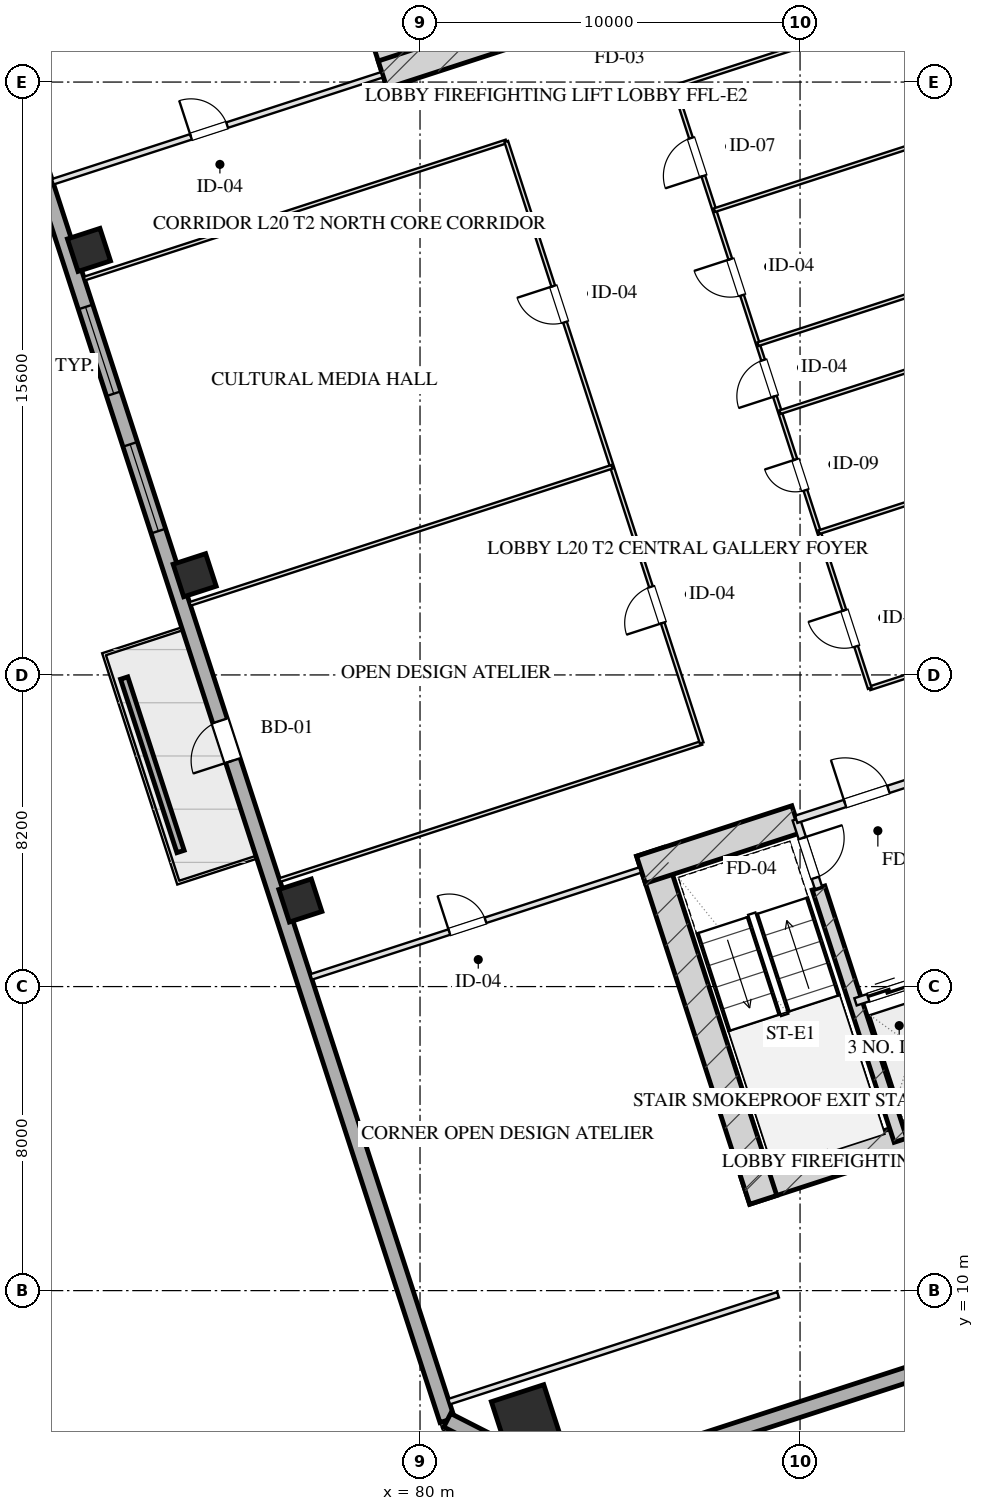
"""IFC4 building model, lengths in metres.
Left out: names, types, materials, properties, quantities, classifications, styles, units other than length and angle.
Written with IfcOpenShell. Run it as: python <this file> out.ifc"""

import sys

from ifc_helpers import new_model, si_unit, direction, frame, frame_2d, origin, origin_2d, place, context, subcontext, project, spatial, rectangle, hollow_rectangle, extrude, element, fill, save


model = new_model("IFC4")
c1 = context("Model", 3, precision=1e-05, world=origin(), true_north=direction((0.0, 1.0)))
c2 = subcontext(c1, "Body", "Model", "MODEL_VIEW")
j1 = project(units=[si_unit("LENGTHUNIT", "METRE"), si_unit("PLANEANGLEUNIT", "RADIAN")], contexts=[c1])
p1 = place(None, origin())
s1 = spatial("IfcSite", under=j1, at=p1, CompositionType="ELEMENT")
p2 = place(p1, origin())
s2 = spatial("IfcBuilding", under=s1, at=p2, CompositionType="ELEMENT")
p3 = place(p2, frame((0.0, 0.0, 81.65)))
s3 = spatial("IfcBuildingStorey", under=s2, at=p3, CompositionType="ELEMENT", Elevation=81.65)
p4 = place(p3, frame((88.559, 12.629, 0.0), z_axis=(0.0, 0.0, 1.0), x_axis=(0.951056072937, 0.309018358888, 0.0)))
e1 = element("IfcWall", 1, at=p4, inside=s3, PredefinedType="SHEAR", context=c2, shape_type="SweptSolid", body=[
    extrude(rectangle(XDim=16.55, YDim=0.75, at=frame_2d((8.275, 0.0))), origin(), (0.0, 0.0, 1.0), 3.45),
])
p5 = place(p3, frame((86.055, 21.546, 0.0), z_axis=(0.0, 0.0, 1.0), x_axis=(0.309023585745, -0.951054374604, 0.0)))
e2 = element("IfcWall", 2, at=p5, inside=s3, PredefinedType="SHEAR", context=c2, shape_type="SweptSolid", body=[
    extrude(rectangle(XDim=9.63, YDim=0.75, at=frame_2d((4.815, 0.0))), origin(), (0.0, 0.0, 1.0), 3.45),
])
p6 = place(p3, frame((90.486, 20.594, 0.0), z_axis=(0.0, 0.0, 1.0), x_axis=(0.309020428229, -0.951055400562, 0.0)))
e3 = element("IfcWall", 3, at=p6, inside=s3, PredefinedType="SHEAR", context=c2, shape_type="SweptSolid", body=[
    extrude(rectangle(XDim=6.98, YDim=0.35, at=frame_2d((3.49, 0.0))), origin(), (0.0, 0.0, 1.0), 3.45),
])
p7 = place(p3, frame((85.814, 21.074, 0.0), z_axis=(0.0, 0.0, 1.0), x_axis=(0.95106580992, 0.308988390074, 0.0)))
e4 = element("IfcWall", 4, at=p7, inside=s3, PredefinedType="SHEAR", context=c2, shape_type="SweptSolid", body=[
    extrude(rectangle(XDim=4.295, YDim=0.75, at=frame_2d((2.147, 0.0))), origin(), (0.0, 0.0, 1.0), 3.45),
])
p8 = place(p3, frame((79.489, 41.756, 0.0), z_axis=(0.0, 0.0, 1.0), x_axis=(-0.309016134813, 0.951056795583, 0.0)))
e5 = element("IfcWall", 5, at=p8, inside=s3, PredefinedType="SHEAR", context=c2, shape_type="SweptSolid", body=[
    extrude(rectangle(XDim=9.63, YDim=0.75, at=frame_2d((4.815, 0.0))), origin(), (0.0, 0.0, 1.0), 3.45),
])
p9 = place(p3, frame((79.016, 41.997, 0.0), z_axis=(0.0, 0.0, 1.0), x_axis=(0.95106038264, 0.309005094736, 0.0)))
e6 = element("IfcWall", 6, at=p9, inside=s3, PredefinedType="SHEAR", context=c2, shape_type="SweptSolid", body=[
    extrude(rectangle(XDim=4.295, YDim=0.75, at=frame_2d((2.147, 0.0))), origin(), (0.0, 0.0, 1.0), 3.45),
])
p10 = place(p3, frame((82.791, 6.612, 0.0), z_axis=(0.0, 0.0, 1.0), x_axis=(0.951056516295, 0.309016994375, 0.0)))
e7 = element("IfcColumn", 7, at=p10, inside=s3, PredefinedType="COLUMN", context=c2, shape_type="SweptSolid", body=[
    extrude(hollow_rectangle(XDim=1.45, YDim=1.45, WallThickness=0.05, at=origin_2d()), origin(), (0.0, 0.0, 1.0), 3.451),
])
for number, where, z_axis, x_axis in (
    (8, (76.851, 20.264, 0.0), (0.0, 0.0, 1.0), (0.951, 0.309, 0.0)),
    (9, (74.07, 28.824, 0.0), (0.0, 0.0, 1.0), (0.951, 0.309, 0.0)),
    (10, (71.289, 37.384, 0.0), (0.0, 0.0, 1.0), (0.951, 0.309, 0.0)),
):
    element("IfcColumn", number, at=place(p3, frame(where, z_axis=z_axis, x_axis=x_axis)), inside=s3, PredefinedType="COLUMN", context=c2, shape_type="SweptSolid", body=[
        extrude(hollow_rectangle(XDim=0.9, YDim=0.9, WallThickness=0.032, at=origin_2d()), origin(), (0.0, 0.0, 1.0), 3.451),
    ])
p11 = place(p3, frame((80.716, 6.59, 0.0), z_axis=(0.0, 0.0, 1.0), x_axis=(-0.309017542002, 0.95105633836, 0.0)))
e11 = element("IfcWall", 11, at=p11, inside=s3, PredefinedType="SOLIDWALL", context=c2, shape_type="SweptSolid", body=[
    extrude(rectangle(XDim=46.4, YDim=0.4, at=frame_2d((23.2, 0.0))), origin(), (0.0, 0.0, 1.0), 2.61),
])
p12 = place(p11, frame((24.6, 0.0, 0.75)))
e12 = element("IfcOpeningElement", 12, at=p12, cuts=e11, PredefinedType="OPENING", context=c2, shape_type="SweptSolid", body=[
    extrude(rectangle(XDim=2.4, YDim=1.46, at=frame_2d((1.2, 0.73))), frame((0.0, 0.21, 0.0), z_axis=(0.0, -1.0, 0.0), x_axis=(1.0, 0.0, 0.0)), (0.0, 0.0, 1.0), 0.42),
])
p13 = place(p11, frame((28.4, 0.0, 0.75)))
e13 = element("IfcOpeningElement", 13, at=p13, cuts=e11, PredefinedType="OPENING", context=c2, shape_type="SweptSolid", body=[
    extrude(rectangle(XDim=2.4, YDim=1.46, at=frame_2d((1.2, 0.73))), frame((0.0, 0.21, 0.0), z_axis=(0.0, -1.0, 0.0), x_axis=(1.0, 0.0, 0.0)), (0.0, 0.0, 1.0), 0.42),
])
p14 = place(p11, frame((18.25, 0.0, 0.0)))
e14 = element("IfcOpeningElement", 14, at=p14, cuts=e11, PredefinedType="OPENING", context=c2, shape_type="SweptSolid", body=[
    extrude(rectangle(XDim=1.1, YDim=2.15, at=frame_2d((0.55, 1.075))), frame((0.0, 0.21, 0.0), z_axis=(0.0, -1.0, 0.0), x_axis=(1.0, 0.0, 0.0)), (0.0, 0.0, 1.0), 0.42),
])
p15 = place(p3, frame((111.953, 14.005, 0.0), z_axis=(0.0, 0.0, 1.0), x_axis=(-0.95105505922, -0.309021478754, 0.0)))
e15 = element("IfcWall", 15, at=p15, inside=s3, PredefinedType="SOLIDWALL", context=c2, shape_type="SweptSolid", body=[
    extrude(rectangle(XDim=29.4, YDim=0.4, at=frame_2d((14.7, 0.0))), origin(), (0.0, 0.0, 1.0), 2.61),
])
p16 = place(p3, frame((83.992, 4.92, 0.0), z_axis=(0.0, 0.0, 1.0), x_axis=(-0.891001999643, 0.45399937955, 0.0)))
e16 = element("IfcWall", 16, at=p16, inside=s3, PredefinedType="SOLIDWALL", context=c2, shape_type="SweptSolid", body=[
    extrude(rectangle(XDim=3.677, YDim=0.4, at=frame_2d((1.839, 0.0))), origin(), (0.0, 0.0, 1.0), 2.61),
])
p17 = place(p3, frame((73.698, 21.553, 0.0), z_axis=(0.0, 0.0, 1.0), x_axis=(-0.309032019345, 0.951051634255, 0.0)))
e17 = element("IfcWall", 17, at=p17, inside=s3, PredefinedType="PARAPET", context=c2, shape_type="SweptSolid", body=[
    extrude(rectangle(XDim=4.8, YDim=0.2, at=frame_2d((2.4, 0.0))), origin(), (0.0, 0.0, 1.0), 0.75),
])
p18 = place(p3, frame((89.899, 22.401, 0.0), z_axis=(0.0, 0.0, 1.0), x_axis=(0.308932062672, -0.951084108086, 0.0)))
e18 = element("IfcWall", 18, at=p18, inside=s3, PredefinedType="PARTITIONING", context=c2, shape_type="SweptSolid", body=[
    extrude(rectangle(XDim=1.9, YDim=0.2, at=frame_2d((0.95, 0.0))), origin(), (0.0, 0.0, 1.0), 3.175),
])
p19 = place(p18, frame((0.52, 0.0, 0.0)))
e19 = element("IfcOpeningElement", 19, at=p19, cuts=e18, PredefinedType="OPENING", context=c2, shape_type="SweptSolid", body=[
    extrude(rectangle(XDim=1.1, YDim=2.05, at=frame_2d((0.55, 1.025))), frame((0.0, 0.11, 0.0), z_axis=(0.0, -1.0, 0.0), x_axis=(1.0, 0.0, 0.0)), (0.0, 0.0, 1.0), 0.22),
])
p20 = place(p3, frame((89.899, 22.401, 0.0), z_axis=(0.0, 0.0, 1.0), x_axis=(0.951046716504, 0.309047153403, 0.0)))
e20 = element("IfcWall", 20, at=p20, inside=s3, PredefinedType="PARTITIONING", context=c2, shape_type="SweptSolid", body=[
    extrude(rectangle(XDim=3.83, YDim=0.2, at=frame_2d((1.915, 0.0))), origin(), (0.0, 0.0, 1.0), 3.175),
])
p21 = place(p20, frame((1.35, 0.0, 0.0)))
e21 = element("IfcOpeningElement", 21, at=p21, cuts=e20, PredefinedType="OPENING", context=c2, shape_type="SweptSolid", body=[
    extrude(rectangle(XDim=1.2, YDim=2.05, at=frame_2d((0.6, 1.025))), frame((0.0, 0.11, 0.0), z_axis=(0.0, -1.0, 0.0), x_axis=(1.0, 0.0, 0.0)), (0.0, 0.0, 1.0), 0.22),
])
p22 = place(p3, frame((91.46, 17.598, 0.0), z_axis=(0.0, 0.0, 1.0), x_axis=(0.951062257173, 0.308999325213, 0.0)))
e22 = element("IfcWall", 22, at=p22, inside=s3, PredefinedType="PARTITIONING", context=c2, shape_type="SweptSolid", body=[
    extrude(rectangle(XDim=2.1, YDim=0.2, at=frame_2d((1.05, 0.0))), origin(), (0.0, 0.0, 1.0), 3.175),
])
p23 = place(p22, frame((0.35, 0.0, 0.0)))
e23 = element("IfcOpeningElement", 23, at=p23, cuts=e22, PredefinedType="OPENING", context=c2, shape_type="SweptSolid", body=[
    extrude(rectangle(XDim=1.1, YDim=2.05, at=frame_2d((0.55, 1.025))), frame((0.0, 0.11, 0.0), z_axis=(0.0, -1.0, 0.0), x_axis=(1.0, 0.0, 0.0)), (0.0, 0.0, 1.0), 0.22),
])
p24 = place(p3, frame((80.767, 7.079, 0.0), z_axis=(0.0, 0.0, 1.0), x_axis=(0.951057133767, 0.309015093986, 0.0)))
e24 = element("IfcWall", 24, at=p24, inside=s3, PredefinedType="PARTITIONING", context=c2, shape_type="SweptSolid", body=[
    extrude(rectangle(XDim=9.1, YDim=0.15, at=frame_2d((4.55, 0.0))), origin(), (0.0, 0.0, 1.0), 3.175),
])
p25 = place(p3, frame((77.136, 18.254, 0.0), z_axis=(0.0, 0.0, 1.0), x_axis=(0.951057133767, 0.309015093986, 0.0)))
e25 = element("IfcWall", 25, at=p25, inside=s3, PredefinedType="PARTITIONING", context=c2, shape_type="SweptSolid", body=[
    extrude(rectangle(XDim=9.1, YDim=0.15, at=frame_2d((4.55, 0.0))), origin(), (0.0, 0.0, 1.0), 3.175),
])
p26 = place(p25, frame((3.822, 0.0, 0.0)))
e26 = element("IfcOpeningElement", 26, at=p26, cuts=e25, PredefinedType="OPENING", context=c2, shape_type="SweptSolid", body=[
    extrude(rectangle(XDim=1.0, YDim=2.05, at=frame_2d((0.5, 1.025))), frame((0.0, 0.085, 0.0), z_axis=(0.0, -1.0, 0.0), x_axis=(1.0, 0.0, 0.0)), (0.0, 0.0, 1.0), 0.17),
])
p27 = place(p3, frame((70.338, 39.177, 0.0), z_axis=(0.0, 0.0, 1.0), x_axis=(0.951059695568, 0.309007209409, 0.0)))
e27 = element("IfcWall", 27, at=p27, inside=s3, PredefinedType="PARTITIONING", context=c2, shape_type="SweptSolid", body=[
    extrude(rectangle(XDim=9.1, YDim=0.15, at=frame_2d((4.55, 0.0))), origin(), (0.0, 0.0, 1.0), 3.175),
])
p28 = place(p27, frame((3.822, 0.0, 0.0)))
e28 = element("IfcOpeningElement", 28, at=p28, cuts=e27, PredefinedType="OPENING", context=c2, shape_type="SweptSolid", body=[
    extrude(rectangle(XDim=1.0, YDim=2.05, at=frame_2d((0.5, 1.025))), frame((0.0, 0.085, 0.0), z_axis=(0.0, -1.0, 0.0), x_axis=(1.0, 0.0, 0.0)), (0.0, 0.0, 1.0), 0.17),
])
p29 = place(p3, frame((76.308, 20.803, 0.0), z_axis=(0.0, 0.0, 1.0), x_axis=(0.951054504848, 0.309023184905, 0.0)))
e29 = element("IfcWall", 29, at=p29, inside=s3, PredefinedType="MOVABLE", context=c2, shape_type="SweptSolid", body=[
    extrude(rectangle(XDim=11.675, YDim=0.1, at=frame_2d((5.838, 0.0))), origin(), (0.0, 0.0, 1.0), 3.175),
])
p30 = place(p3, frame((91.834, 25.848, 0.0), z_axis=(0.0, 0.0, 1.0), x_axis=(0.951055746746, 0.309019362795, 0.0)))
e30 = element("IfcWall", 30, at=p30, inside=s3, PredefinedType="MOVABLE", context=c2, shape_type="SweptSolid", body=[
    extrude(rectangle(XDim=17.875, YDim=0.1, at=frame_2d((8.938, 0.0))), origin(), (0.0, 0.0, 1.0), 3.175),
])
p31 = place(p3, frame((71.166, 36.629, 0.0), z_axis=(0.0, 0.0, 1.0), x_axis=(0.951058653673, 0.309010416124, 0.0)))
e31 = element("IfcWall", 31, at=p31, inside=s3, PredefinedType="MOVABLE", context=c2, shape_type="SweptSolid", body=[
    extrude(rectangle(XDim=11.675, YDim=0.1, at=frame_2d((5.837, 0.0))), origin(), (0.0, 0.0, 1.0), 3.175),
])
p32 = place(p3, frame((86.692, 41.673, 0.0), z_axis=(0.0, 0.0, 1.0), x_axis=(0.951057050993, 0.309015348739, 0.0)))
e32 = element("IfcWall", 32, at=p32, inside=s3, PredefinedType="MOVABLE", context=c2, shape_type="SweptSolid", body=[
    extrude(rectangle(XDim=17.875, YDim=0.1, at=frame_2d((8.938, 0.0))), origin(), (0.0, 0.0, 1.0), 3.175),
])
p33 = place(p3, frame((87.412, 24.411, 0.0), z_axis=(0.0, 0.0, 1.0), x_axis=(-0.309022042254, 0.951054876125, 0.0)))
e33 = element("IfcWall", 33, at=p33, inside=s3, PredefinedType="MOVABLE", context=c2, shape_type="SweptSolid", body=[
    extrude(rectangle(XDim=16.64, YDim=0.1, at=frame_2d((8.32, 0.0))), origin(), (0.0, 0.0, 1.0), 3.175),
])
p34 = place(p33, frame((3.32, 0.0, 0.0)))
e34 = element("IfcOpeningElement", 34, at=p34, cuts=e33, PredefinedType="OPENING", context=c2, shape_type="SweptSolid", body=[
    extrude(rectangle(XDim=1.0, YDim=2.05, at=frame_2d((0.5, 1.025))), frame((0.0, 0.06, 0.0), z_axis=(0.0, -1.0, 0.0), x_axis=(1.0, 0.0, 0.0)), (0.0, 0.0, 1.0), 0.12),
])
p35 = place(p33, frame((11.64, 0.0, 0.0)))
e35 = element("IfcOpeningElement", 35, at=p35, cuts=e33, PredefinedType="OPENING", context=c2, shape_type="SweptSolid", body=[
    extrude(rectangle(XDim=1.0, YDim=2.05, at=frame_2d((0.5, 1.025))), frame((0.0, 0.06, 0.0), z_axis=(0.0, -1.0, 0.0), x_axis=(1.0, 0.0, 0.0)), (0.0, 0.0, 1.0), 0.12),
])
p36 = place(p3, frame((91.834, 25.848, 0.0), z_axis=(0.0, 0.0, 1.0), x_axis=(-0.30901773025, 0.951056277195, 0.0)))
e36 = element("IfcWall", 36, at=p36, inside=s3, PredefinedType="MOVABLE", context=c2, shape_type="SweptSolid", body=[
    extrude(rectangle(XDim=16.64, YDim=0.1, at=frame_2d((8.32, 0.0))), origin(), (0.0, 0.0, 1.0), 3.175),
])
p37 = place(p36, frame((1.16, 0.0, 0.0)))
e37 = element("IfcOpeningElement", 37, at=p37, cuts=e36, PredefinedType="OPENING", context=c2, shape_type="SweptSolid", body=[
    extrude(rectangle(XDim=1.0, YDim=2.05, at=frame_2d((0.5, 1.025))), frame((0.0, 0.06, 0.0), z_axis=(0.0, -1.0, 0.0), x_axis=(1.0, 0.0, 0.0)), (0.0, 0.0, 1.0), 0.12),
])
p38 = place(p36, frame((5.48, 0.0, 0.0)))
e38 = element("IfcOpeningElement", 38, at=p38, cuts=e36, PredefinedType="OPENING", context=c2, shape_type="SweptSolid", body=[
    extrude(rectangle(XDim=0.85, YDim=2.05, at=frame_2d((0.425, 1.025))), frame((0.0, 0.06, 0.0), z_axis=(0.0, -1.0, 0.0), x_axis=(1.0, 0.0, 0.0)), (0.0, 0.0, 1.0), 0.12),
])
p39 = place(p36, frame((8.08, 0.0, 0.0)))
e39 = element("IfcOpeningElement", 39, at=p39, cuts=e36, PredefinedType="OPENING", context=c2, shape_type="SweptSolid", body=[
    extrude(rectangle(XDim=1.0, YDim=2.05, at=frame_2d((0.5, 1.025))), frame((0.0, 0.06, 0.0), z_axis=(0.0, -1.0, 0.0), x_axis=(1.0, 0.0, 0.0)), (0.0, 0.0, 1.0), 0.12),
])
p40 = place(p36, frame((10.874, 0.0, 0.0)))
e40 = element("IfcOpeningElement", 40, at=p40, cuts=e36, PredefinedType="OPENING", context=c2, shape_type="SweptSolid", body=[
    extrude(rectangle(XDim=1.0, YDim=2.05, at=frame_2d((0.5, 1.025))), frame((0.0, 0.06, 0.0), z_axis=(0.0, -1.0, 0.0), x_axis=(1.0, 0.0, 0.0)), (0.0, 0.0, 1.0), 0.12),
])
p41 = place(p36, frame((14.174, 0.0, 0.0)))
e41 = element("IfcOpeningElement", 41, at=p41, cuts=e36, PredefinedType="OPENING", context=c2, shape_type="SweptSolid", body=[
    extrude(rectangle(XDim=1.05, YDim=2.05, at=frame_2d((0.525, 1.025))), frame((0.0, 0.06, 0.0), z_axis=(0.0, -1.0, 0.0), x_axis=(1.0, 0.0, 0.0)), (0.0, 0.0, 1.0), 0.12),
])
p42 = place(p3, frame((73.947, 28.069, 0.0), z_axis=(0.0, 0.0, 1.0), x_axis=(0.951058653673, 0.309010416124, 0.0)))
e42 = element("IfcWall", 42, at=p42, inside=s3, PredefinedType="MOVABLE", context=c2, shape_type="SweptSolid", body=[
    extrude(rectangle(XDim=11.675, YDim=0.1, at=frame_2d((5.837, 0.0))), origin(), (0.0, 0.0, 1.0), 3.175),
])
for number, where, z_axis, x_axis in (
    (43, (90.499, 29.956, 0.0), (0.0, 0.0, 1.0), (0.951, 0.309, 0.0)),
    (44, (89.473, 33.114, 0.0), (0.0, 0.0, 1.0), (0.951, 0.309, 0.0)),
):
    element("IfcWall", number, at=place(p3, frame(where, z_axis=z_axis, x_axis=x_axis)), inside=s3, PredefinedType="MOVABLE", context=c2, shape_type="SweptSolid", body=[
        extrude(rectangle(XDim=17.875, YDim=0.1, at=frame_2d((8.938, 0.0))), origin(), (0.0, 0.0, 1.0), 3.175),
    ])
for number, where, z_axis, x_axis in (
    (45, (88.892, 34.902, 0.0), (0.0, 0.0, 1.0), (0.951, 0.309, 0.0)),
    (46, (87.746, 38.429, 0.0), (0.0, 0.0, 1.0), (0.951, 0.309, 0.0)),
):
    element("IfcWall", number, at=place(p3, frame(where, z_axis=z_axis, x_axis=x_axis)), inside=s3, PredefinedType="MOVABLE", context=c2, shape_type="SweptSolid", body=[
        extrude(rectangle(XDim=17.875, YDim=0.1, at=frame_2d((8.938, 0.0))), origin(), (0.0, 0.0, 1.0), 3.175),
    ])
p43 = place(p12, origin())
e47 = element("IfcWindow", 47, at=p43, inside=s3, PartitioningType="TRIPLE_PANEL_VERTICAL", PredefinedType="WINDOW", context=c2, shape_type="SweptSolid", body=[
    extrude(rectangle(XDim=2.4, YDim=1.46, at=frame_2d((1.2, 0.73))), frame((0.0, 0.03, 0.0), z_axis=(0.0, -1.0, 0.0), x_axis=(1.0, 0.0, 0.0)), (0.0, 0.0, 1.0), 0.06),
])
fill(e12, e47)
p44 = place(p13, origin())
e48 = element("IfcWindow", 48, at=p44, inside=s3, PartitioningType="TRIPLE_PANEL_VERTICAL", PredefinedType="WINDOW", context=c2, shape_type="SweptSolid", body=[
    extrude(rectangle(XDim=2.4, YDim=1.46, at=frame_2d((1.2, 0.73))), frame((0.0, 0.03, 0.0), z_axis=(0.0, -1.0, 0.0), x_axis=(1.0, 0.0, 0.0)), (0.0, 0.0, 1.0), 0.06),
])
fill(e13, e48)
p45 = place(p14, origin())
e49 = element("IfcDoor", 49, at=p45, inside=s3, OperationType="SINGLE_SWING_LEFT", PredefinedType="DOOR", context=c2, shape_type="SweptSolid", body=[
    extrude(rectangle(XDim=1.1, YDim=2.15, at=frame_2d((0.55, 1.075))), frame((0.0, 0.025, 0.0), z_axis=(0.0, -1.0, 0.0), x_axis=(1.0, 0.0, 0.0)), (0.0, 0.0, 1.0), 0.05),
])
fill(e14, e49)
p46 = place(p19, origin())
e50 = element("IfcDoor", 50, at=p46, inside=s3, OperationType="SINGLE_SWING_LEFT", PredefinedType="DOOR", context=c2, shape_type="SweptSolid", body=[
    extrude(rectangle(XDim=1.1, YDim=2.05, at=frame_2d((0.55, 1.025))), frame((0.0, 0.025, 0.0), z_axis=(0.0, -1.0, 0.0), x_axis=(1.0, 0.0, 0.0)), (0.0, 0.0, 1.0), 0.05),
])
fill(e19, e50)
p47 = place(p21, origin())
e51 = element("IfcDoor", 51, at=p47, inside=s3, OperationType="SINGLE_SWING_LEFT", PredefinedType="DOOR", context=c2, shape_type="SweptSolid", body=[
    extrude(rectangle(XDim=1.2, YDim=2.05, at=frame_2d((0.6, 1.025))), frame((0.0, 0.025, 0.0), z_axis=(0.0, -1.0, 0.0), x_axis=(1.0, 0.0, 0.0)), (0.0, 0.0, 1.0), 0.05),
])
fill(e21, e51)
p48 = place(p23, origin())
e52 = element("IfcDoor", 52, at=p48, inside=s3, OperationType="DOUBLE_DOOR_SLIDING", PredefinedType="DOOR", context=c2, shape_type="SweptSolid", body=[
    extrude(rectangle(XDim=1.1, YDim=2.05, at=frame_2d((0.55, 1.025))), frame((0.0, 0.025, 0.0), z_axis=(0.0, -1.0, 0.0), x_axis=(1.0, 0.0, 0.0)), (0.0, 0.0, 1.0), 0.05),
])
fill(e23, e52)
p49 = place(p26, origin())
e53 = element("IfcDoor", 53, at=p49, inside=s3, OperationType="SINGLE_SWING_LEFT", PredefinedType="DOOR", context=c2, shape_type="SweptSolid", body=[
    extrude(rectangle(XDim=1.0, YDim=2.05, at=frame_2d((0.5, 1.025))), frame((0.0, 0.025, 0.0), z_axis=(0.0, -1.0, 0.0), x_axis=(1.0, 0.0, 0.0)), (0.0, 0.0, 1.0), 0.05),
])
fill(e26, e53)
p50 = place(p28, origin())
e54 = element("IfcDoor", 54, at=p50, inside=s3, OperationType="SINGLE_SWING_LEFT", PredefinedType="DOOR", context=c2, shape_type="SweptSolid", body=[
    extrude(rectangle(XDim=1.0, YDim=2.05, at=frame_2d((0.5, 1.025))), frame((0.0, 0.025, 0.0), z_axis=(0.0, -1.0, 0.0), x_axis=(1.0, 0.0, 0.0)), (0.0, 0.0, 1.0), 0.05),
])
fill(e28, e54)
p51 = place(p34, origin())
e55 = element("IfcDoor", 55, at=p51, inside=s3, OperationType="SINGLE_SWING_LEFT", PredefinedType="DOOR", context=c2, shape_type="SweptSolid", body=[
    extrude(rectangle(XDim=1.0, YDim=2.05, at=frame_2d((0.5, 1.025))), frame((0.0, 0.025, 0.0), z_axis=(0.0, -1.0, 0.0), x_axis=(1.0, 0.0, 0.0)), (0.0, 0.0, 1.0), 0.05),
])
fill(e34, e55)
p52 = place(p35, origin())
e56 = element("IfcDoor", 56, at=p52, inside=s3, OperationType="SINGLE_SWING_RIGHT", PredefinedType="DOOR", context=c2, shape_type="SweptSolid", body=[
    extrude(rectangle(XDim=1.0, YDim=2.05, at=frame_2d((0.5, 1.025))), frame((0.0, 0.025, 0.0), z_axis=(0.0, -1.0, 0.0), x_axis=(1.0, 0.0, 0.0)), (0.0, 0.0, 1.0), 0.05),
])
fill(e35, e56)
p53 = place(p37, origin())
e57 = element("IfcDoor", 57, at=p53, inside=s3, OperationType="SINGLE_SWING_RIGHT", PredefinedType="DOOR", context=c2, shape_type="SweptSolid", body=[
    extrude(rectangle(XDim=1.0, YDim=2.05, at=frame_2d((0.5, 1.025))), frame((0.0, 0.025, 0.0), z_axis=(0.0, -1.0, 0.0), x_axis=(1.0, 0.0, 0.0)), (0.0, 0.0, 1.0), 0.05),
])
fill(e37, e57)
p54 = place(p38, origin())
e58 = element("IfcDoor", 58, at=p54, inside=s3, OperationType="SINGLE_SWING_RIGHT", PredefinedType="DOOR", context=c2, shape_type="SweptSolid", body=[
    extrude(rectangle(XDim=0.85, YDim=2.05, at=frame_2d((0.425, 1.025))), frame((0.0, 0.025, 0.0), z_axis=(0.0, -1.0, 0.0), x_axis=(1.0, 0.0, 0.0)), (0.0, 0.0, 1.0), 0.05),
])
fill(e38, e58)
p55 = place(p39, origin())
e59 = element("IfcDoor", 59, at=p55, inside=s3, OperationType="SINGLE_SWING_LEFT", PredefinedType="DOOR", context=c2, shape_type="SweptSolid", body=[
    extrude(rectangle(XDim=1.0, YDim=2.05, at=frame_2d((0.5, 1.025))), frame((0.0, 0.025, 0.0), z_axis=(0.0, -1.0, 0.0), x_axis=(1.0, 0.0, 0.0)), (0.0, 0.0, 1.0), 0.05),
])
fill(e39, e59)
p56 = place(p40, origin())
e60 = element("IfcDoor", 60, at=p56, inside=s3, OperationType="SINGLE_SWING_RIGHT", PredefinedType="DOOR", context=c2, shape_type="SweptSolid", body=[
    extrude(rectangle(XDim=1.0, YDim=2.05, at=frame_2d((0.5, 1.025))), frame((0.0, 0.025, 0.0), z_axis=(0.0, -1.0, 0.0), x_axis=(1.0, 0.0, 0.0)), (0.0, 0.0, 1.0), 0.05),
])
fill(e40, e60)
p57 = place(p41, origin())
e61 = element("IfcDoor", 61, at=p57, inside=s3, OperationType="SINGLE_SWING_LEFT", PredefinedType="DOOR", context=c2, shape_type="SweptSolid", body=[
    extrude(rectangle(XDim=1.05, YDim=2.05, at=frame_2d((0.525, 1.025))), frame((0.0, 0.025, 0.0), z_axis=(0.0, -1.0, 0.0), x_axis=(1.0, 0.0, 0.0)), (0.0, 0.0, 1.0), 0.05),
])
fill(e41, e61)
save(model, sys.argv[1])
